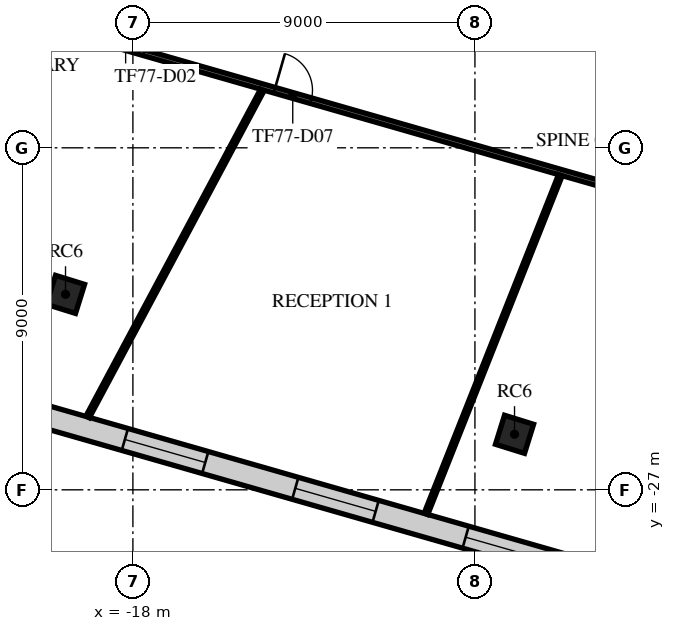
"""IFC4 building model, lengths in metres.
Left out: names, types, materials, properties, quantities, classifications, styles, units other than length and angle.
Written with IfcOpenShell. Run it as: python <this file> out.ifc"""

import sys

from ifc_helpers import new_model, si_unit, direction, frame, frame_2d, origin, origin_2d, place, context, subcontext, project, spatial, rectangle, extrude, element, fill, save


model = new_model("IFC4")
c1 = context("Model", 3, precision=1e-05, world=origin(), true_north=direction((0.0, 1.0)))
c2 = subcontext(c1, "Body", "Model", "MODEL_VIEW")
j1 = project(units=[si_unit("LENGTHUNIT", "METRE"), si_unit("PLANEANGLEUNIT", "RADIAN")], contexts=[c1])
p1 = place(None, origin())
s1 = spatial("IfcSite", under=j1, at=p1, CompositionType="ELEMENT")
p2 = place(p1, origin())
s2 = spatial("IfcBuilding", under=s1, at=p2, CompositionType="ELEMENT")
p3 = place(p2, frame((0.0, 0.0, 324.5)))
s3 = spatial("IfcBuildingStorey", under=s2, at=p3, CompositionType="ELEMENT", Elevation=324.5)
for number, where, z_axis, x_axis in (
    (1, (-19.773, -21.857, 0.0), (0.0, 0.0, 1.0), (0.298, 0.955, 0.0)),
    (2, (-7.958, -25.539, 0.0), (0.0, 0.0, 1.0), (0.298, 0.955, 0.0)),
):
    element("IfcColumn", number, at=place(p3, frame(where, z_axis=z_axis, x_axis=x_axis)), inside=s3, PredefinedType="COLUMN", context=c2, shape_type="SweptSolid", body=[
        extrude(rectangle(XDim=0.8, YDim=0.8, at=origin_2d()), origin(), (0.0, 0.0, 1.0), 4.0),
    ])
p4 = place(p3, frame((-18.913, 30.91, 0.0), z_axis=(0.0, 0.0, 1.0), x_axis=(-0.275636693765, -0.961261885778, 0.0)))
e3 = element("IfcWall", 3, at=p4, inside=s3, PredefinedType="STANDARD", context=c2, shape_type="SweptSolid", body=[
    extrude(rectangle(XDim=48.49, YDim=0.6, at=frame_2d((24.245, 0.0))), origin(), (0.0, 0.0, 1.0), 3.65),
])
p5 = place(p4, frame((1.204, 0.0, 0.9)))
e4 = element("IfcOpeningElement", 4, at=p5, cuts=e3, PredefinedType="OPENING", context=c2, shape_type="SweptSolid", body=[
    extrude(rectangle(XDim=2.0, YDim=2.1, at=frame_2d((1.0, 1.05))), frame((0.0, 0.31, 0.0), z_axis=(0.0, -1.0, 0.0), x_axis=(1.0, 0.0, 0.0)), (0.0, 0.0, 1.0), 0.62),
])
p6 = place(p4, frame((5.612, 0.0, 0.9)))
e5 = element("IfcOpeningElement", 5, at=p6, cuts=e3, PredefinedType="OPENING", context=c2, shape_type="SweptSolid", body=[
    extrude(rectangle(XDim=2.0, YDim=2.1, at=frame_2d((1.0, 1.05))), frame((0.0, 0.31, 0.0), z_axis=(0.0, -1.0, 0.0), x_axis=(1.0, 0.0, 0.0)), (0.0, 0.0, 1.0), 0.62),
])
p7 = place(p4, frame((10.021, 0.0, 0.9)))
e6 = element("IfcOpeningElement", 6, at=p7, cuts=e3, PredefinedType="OPENING", context=c2, shape_type="SweptSolid", body=[
    extrude(rectangle(XDim=2.0, YDim=2.1, at=frame_2d((1.0, 1.05))), frame((0.0, 0.31, 0.0), z_axis=(0.0, -1.0, 0.0), x_axis=(1.0, 0.0, 0.0)), (0.0, 0.0, 1.0), 0.62),
])
p8 = place(p4, frame((14.428, 0.0, 0.9)))
e7 = element("IfcOpeningElement", 7, at=p8, cuts=e3, PredefinedType="OPENING", context=c2, shape_type="SweptSolid", body=[
    extrude(rectangle(XDim=2.0, YDim=2.1, at=frame_2d((1.0, 1.05))), frame((0.0, 0.31, 0.0), z_axis=(0.0, -1.0, 0.0), x_axis=(1.0, 0.0, 0.0)), (0.0, 0.0, 1.0), 0.62),
])
p9 = place(p4, frame((18.837, 0.0, 0.9)))
e8 = element("IfcOpeningElement", 8, at=p9, cuts=e3, PredefinedType="OPENING", context=c2, shape_type="SweptSolid", body=[
    extrude(rectangle(XDim=2.0, YDim=2.1, at=frame_2d((1.0, 1.05))), frame((0.0, 0.31, 0.0), z_axis=(0.0, -1.0, 0.0), x_axis=(1.0, 0.0, 0.0)), (0.0, 0.0, 1.0), 0.62),
])
p10 = place(p4, frame((23.245, 0.0, 0.9)))
e9 = element("IfcOpeningElement", 9, at=p10, cuts=e3, PredefinedType="OPENING", context=c2, shape_type="SweptSolid", body=[
    extrude(rectangle(XDim=2.0, YDim=2.1, at=frame_2d((1.0, 1.05))), frame((0.0, 0.31, 0.0), z_axis=(0.0, -1.0, 0.0), x_axis=(1.0, 0.0, 0.0)), (0.0, 0.0, 1.0), 0.62),
])
p11 = place(p4, frame((27.653, 0.0, 0.9)))
e10 = element("IfcOpeningElement", 10, at=p11, cuts=e3, PredefinedType="OPENING", context=c2, shape_type="SweptSolid", body=[
    extrude(rectangle(XDim=2.0, YDim=2.1, at=frame_2d((1.0, 1.05))), frame((0.0, 0.31, 0.0), z_axis=(0.0, -1.0, 0.0), x_axis=(1.0, 0.0, 0.0)), (0.0, 0.0, 1.0), 0.62),
])
p12 = place(p4, frame((32.061, 0.0, 0.9)))
e11 = element("IfcOpeningElement", 11, at=p12, cuts=e3, PredefinedType="OPENING", context=c2, shape_type="SweptSolid", body=[
    extrude(rectangle(XDim=2.0, YDim=2.1, at=frame_2d((1.0, 1.05))), frame((0.0, 0.31, 0.0), z_axis=(0.0, -1.0, 0.0), x_axis=(1.0, 0.0, 0.0)), (0.0, 0.0, 1.0), 0.62),
])
p13 = place(p4, frame((36.469, 0.0, 0.9)))
e12 = element("IfcOpeningElement", 12, at=p13, cuts=e3, PredefinedType="OPENING", context=c2, shape_type="SweptSolid", body=[
    extrude(rectangle(XDim=2.0, YDim=2.1, at=frame_2d((1.0, 1.05))), frame((0.0, 0.31, 0.0), z_axis=(0.0, -1.0, 0.0), x_axis=(1.0, 0.0, 0.0)), (0.0, 0.0, 1.0), 0.62),
])
p14 = place(p4, frame((40.877, 0.0, 0.9)))
e13 = element("IfcOpeningElement", 13, at=p14, cuts=e3, PredefinedType="OPENING", context=c2, shape_type="SweptSolid", body=[
    extrude(rectangle(XDim=2.0, YDim=2.1, at=frame_2d((1.0, 1.05))), frame((0.0, 0.31, 0.0), z_axis=(0.0, -1.0, 0.0), x_axis=(1.0, 0.0, 0.0)), (0.0, 0.0, 1.0), 0.62),
])
p15 = place(p4, frame((45.285, 0.0, 0.9)))
e14 = element("IfcOpeningElement", 14, at=p15, cuts=e3, PredefinedType="OPENING", context=c2, shape_type="SweptSolid", body=[
    extrude(rectangle(XDim=2.0, YDim=2.1, at=frame_2d((1.0, 1.05))), frame((0.0, 0.31, 0.0), z_axis=(0.0, -1.0, 0.0), x_axis=(1.0, 0.0, 0.0)), (0.0, 0.0, 1.0), 0.62),
])
p16 = place(p3, frame((-28.363, -22.764, 0.0), z_axis=(0.0, 0.0, 1.0), x_axis=(0.961261250735, -0.275638908422, 0.0)))
e15 = element("IfcWall", 15, at=p16, inside=s3, PredefinedType="STANDARD", context=c2, shape_type="SweptSolid", body=[
    extrude(rectangle(XDim=41.979, YDim=0.6, at=frame_2d((20.99, 0.0))), origin(), (0.0, 0.0, 1.0), 3.65),
])
p17 = place(p16, frame((1.232, 0.0, 0.9)))
e16 = element("IfcOpeningElement", 16, at=p17, cuts=e15, PredefinedType="OPENING", context=c2, shape_type="SweptSolid", body=[
    extrude(rectangle(XDim=2.2, YDim=2.1, at=frame_2d((1.1, 1.05))), frame((0.0, 0.31, 0.0), z_axis=(0.0, -1.0, 0.0), x_axis=(1.0, 0.0, 0.0)), (0.0, 0.0, 1.0), 0.62),
])
p18 = place(p16, frame((5.896, 0.0, 0.9)))
e17 = element("IfcOpeningElement", 17, at=p18, cuts=e15, PredefinedType="OPENING", context=c2, shape_type="SweptSolid", body=[
    extrude(rectangle(XDim=2.2, YDim=2.1, at=frame_2d((1.1, 1.05))), frame((0.0, 0.31, 0.0), z_axis=(0.0, -1.0, 0.0), x_axis=(1.0, 0.0, 0.0)), (0.0, 0.0, 1.0), 0.62),
])
p19 = place(p16, frame((10.561, 0.0, 0.9)))
e18 = element("IfcOpeningElement", 18, at=p19, cuts=e15, PredefinedType="OPENING", context=c2, shape_type="SweptSolid", body=[
    extrude(rectangle(XDim=2.2, YDim=2.1, at=frame_2d((1.1, 1.05))), frame((0.0, 0.31, 0.0), z_axis=(0.0, -1.0, 0.0), x_axis=(1.0, 0.0, 0.0)), (0.0, 0.0, 1.0), 0.62),
])
p20 = place(p16, frame((15.225, 0.0, 0.9)))
e19 = element("IfcOpeningElement", 19, at=p20, cuts=e15, PredefinedType="OPENING", context=c2, shape_type="SweptSolid", body=[
    extrude(rectangle(XDim=2.2, YDim=2.1, at=frame_2d((1.1, 1.05))), frame((0.0, 0.31, 0.0), z_axis=(0.0, -1.0, 0.0), x_axis=(1.0, 0.0, 0.0)), (0.0, 0.0, 1.0), 0.62),
])
p21 = place(p16, frame((19.89, 0.0, 0.9)))
e20 = element("IfcOpeningElement", 20, at=p21, cuts=e15, PredefinedType="OPENING", context=c2, shape_type="SweptSolid", body=[
    extrude(rectangle(XDim=2.2, YDim=2.1, at=frame_2d((1.1, 1.05))), frame((0.0, 0.31, 0.0), z_axis=(0.0, -1.0, 0.0), x_axis=(1.0, 0.0, 0.0)), (0.0, 0.0, 1.0), 0.62),
])
p22 = place(p16, frame((24.554, 0.0, 0.9)))
e21 = element("IfcOpeningElement", 21, at=p22, cuts=e15, PredefinedType="OPENING", context=c2, shape_type="SweptSolid", body=[
    extrude(rectangle(XDim=2.2, YDim=2.1, at=frame_2d((1.1, 1.05))), frame((0.0, 0.31, 0.0), z_axis=(0.0, -1.0, 0.0), x_axis=(1.0, 0.0, 0.0)), (0.0, 0.0, 1.0), 0.62),
])
p23 = place(p16, frame((29.218, 0.0, 0.9)))
e22 = element("IfcOpeningElement", 22, at=p23, cuts=e15, PredefinedType="OPENING", context=c2, shape_type="SweptSolid", body=[
    extrude(rectangle(XDim=2.2, YDim=2.1, at=frame_2d((1.1, 1.05))), frame((0.0, 0.31, 0.0), z_axis=(0.0, -1.0, 0.0), x_axis=(1.0, 0.0, 0.0)), (0.0, 0.0, 1.0), 0.62),
])
p24 = place(p16, frame((33.883, 0.0, 0.9)))
e23 = element("IfcOpeningElement", 23, at=p24, cuts=e15, PredefinedType="OPENING", context=c2, shape_type="SweptSolid", body=[
    extrude(rectangle(XDim=2.2, YDim=2.1, at=frame_2d((1.1, 1.05))), frame((0.0, 0.31, 0.0), z_axis=(0.0, -1.0, 0.0), x_axis=(1.0, 0.0, 0.0)), (0.0, 0.0, 1.0), 0.62),
])
p25 = place(p16, frame((38.547, 0.0, 0.9)))
e24 = element("IfcOpeningElement", 24, at=p25, cuts=e15, PredefinedType="OPENING", context=c2, shape_type="SweptSolid", body=[
    extrude(rectangle(XDim=2.2, YDim=2.1, at=frame_2d((1.1, 1.05))), frame((0.0, 0.31, 0.0), z_axis=(0.0, -1.0, 0.0), x_axis=(1.0, 0.0, 0.0)), (0.0, 0.0, 1.0), 0.62),
])
p26 = place(p3, frame((-24.007, -13.694, 0.0), z_axis=(0.0, 0.0, 1.0), x_axis=(0.961264140923, -0.275628828998, 0.0)))
e25 = element("IfcWall", 25, at=p26, inside=s3, PredefinedType="PARTITIONING", context=c2, shape_type="SweptSolid", body=[
    extrude(rectangle(XDim=38.68, YDim=0.15, at=frame_2d((19.34, 0.0))), origin(), (0.0, 0.0, 1.0), 3.25),
])
p27 = place(p26, frame((0.3, 0.0, 0.0)))
e26 = element("IfcOpeningElement", 26, at=p27, cuts=e25, PredefinedType="OPENING", context=c2, shape_type="SweptSolid", body=[
    extrude(rectangle(XDim=1.8, YDim=2.1, at=frame_2d((0.9, 1.05))), frame((0.0, 0.085, 0.0), z_axis=(0.0, -1.0, 0.0), x_axis=(1.0, 0.0, 0.0)), (0.0, 0.0, 1.0), 0.17),
])
p28 = place(p26, frame((5.55, 0.0, 0.0)))
e27 = element("IfcOpeningElement", 27, at=p28, cuts=e25, PredefinedType="OPENING", context=c2, shape_type="SweptSolid", body=[
    extrude(rectangle(XDim=1.0, YDim=2.1, at=frame_2d((0.5, 1.05))), frame((0.0, 0.085, 0.0), z_axis=(0.0, -1.0, 0.0), x_axis=(1.0, 0.0, 0.0)), (0.0, 0.0, 1.0), 0.17),
])
p29 = place(p26, frame((10.125, 0.0, 0.0)))
e28 = element("IfcOpeningElement", 28, at=p29, cuts=e25, PredefinedType="OPENING", context=c2, shape_type="SweptSolid", body=[
    extrude(rectangle(XDim=1.0, YDim=2.1, at=frame_2d((0.5, 1.05))), frame((0.0, 0.085, 0.0), z_axis=(0.0, -1.0, 0.0), x_axis=(1.0, 0.0, 0.0)), (0.0, 0.0, 1.0), 0.17),
])
p30 = place(p26, frame((23.776, 0.0, 0.0)))
e29 = element("IfcOpeningElement", 29, at=p30, cuts=e25, PredefinedType="OPENING", context=c2, shape_type="SweptSolid", body=[
    extrude(rectangle(XDim=1.0, YDim=2.1, at=frame_2d((0.5, 1.05))), frame((0.0, 0.085, 0.0), z_axis=(0.0, -1.0, 0.0), x_axis=(1.0, 0.0, 0.0)), (0.0, 0.0, 1.0), 0.17),
])
p31 = place(p26, frame((31.675, 0.0, 0.0)))
e30 = element("IfcOpeningElement", 30, at=p31, cuts=e25, PredefinedType="OPENING", context=c2, shape_type="SweptSolid", body=[
    extrude(rectangle(XDim=1.8, YDim=2.1, at=frame_2d((0.9, 1.05))), frame((0.0, 0.085, 0.0), z_axis=(0.0, -1.0, 0.0), x_axis=(1.0, 0.0, 0.0)), (0.0, 0.0, 1.0), 0.17),
])
p32 = place(p3, frame((-19.19, -25.08, 0.0), z_axis=(0.0, 0.0, 1.0), x_axis=(0.471201621995, 0.882025527652, 0.0)))
e31 = element("IfcWall", 31, at=p32, inside=s3, PredefinedType="PARTITIONING", context=c2, shape_type="SweptSolid", body=[
    extrude(rectangle(XDim=9.749, YDim=0.1, at=frame_2d((4.875, 0.0))), origin(), (0.0, 0.0, 1.0), 3.05),
])
p33 = place(p3, frame((-10.289, -27.633, 0.0), z_axis=(0.0, 0.0, 1.0), x_axis=(0.368868227501, 0.929481700057, 0.0)))
e32 = element("IfcWall", 32, at=p33, inside=s3, PredefinedType="PARTITIONING", context=c2, shape_type="SweptSolid", body=[
    extrude(rectangle(XDim=9.584, YDim=0.1, at=frame_2d((4.792, 0.0))), origin(), (0.0, 0.0, 1.0), 3.05),
])
p34 = place(p19, origin())
e33 = element("IfcWindow", 33, at=p34, inside=s3, PartitioningType="SINGLE_PANEL", PredefinedType="WINDOW", context=c2, shape_type="SweptSolid", body=[
    extrude(rectangle(XDim=2.2, YDim=2.1, at=frame_2d((1.1, 1.05))), frame((0.0, 0.03, 0.0), z_axis=(0.0, -1.0, 0.0), x_axis=(1.0, 0.0, 0.0)), (0.0, 0.0, 1.0), 0.06),
])
fill(e18, e33)
p35 = place(p20, origin())
e34 = element("IfcWindow", 34, at=p35, inside=s3, PartitioningType="SINGLE_PANEL", PredefinedType="WINDOW", context=c2, shape_type="SweptSolid", body=[
    extrude(rectangle(XDim=2.2, YDim=2.1, at=frame_2d((1.1, 1.05))), frame((0.0, 0.03, 0.0), z_axis=(0.0, -1.0, 0.0), x_axis=(1.0, 0.0, 0.0)), (0.0, 0.0, 1.0), 0.06),
])
fill(e19, e34)
p36 = place(p21, origin())
e35 = element("IfcWindow", 35, at=p36, inside=s3, PartitioningType="SINGLE_PANEL", PredefinedType="WINDOW", context=c2, shape_type="SweptSolid", body=[
    extrude(rectangle(XDim=2.2, YDim=2.1, at=frame_2d((1.1, 1.05))), frame((0.0, 0.03, 0.0), z_axis=(0.0, -1.0, 0.0), x_axis=(1.0, 0.0, 0.0)), (0.0, 0.0, 1.0), 0.06),
])
fill(e20, e35)
p37 = place(p28, frame((1.0, 0.0, 0.0), z_axis=(0.0, 0.0, 1.0), x_axis=(-1.0, 0.0, 0.0)))
e36 = element("IfcDoor", 36, at=p37, inside=s3, OperationType="SINGLE_SWING_RIGHT", PredefinedType="DOOR", context=c2, shape_type="SweptSolid", body=[
    extrude(rectangle(XDim=1.0, YDim=2.1, at=frame_2d((0.5, 1.05))), frame((0.0, 0.025, 0.0), z_axis=(0.0, -1.0, 0.0), x_axis=(1.0, 0.0, 0.0)), (0.0, 0.0, 1.0), 0.05),
])
fill(e27, e36)
p38 = place(p29, frame((1.0, 0.0, 0.0), z_axis=(0.0, 0.0, 1.0), x_axis=(-1.0, 0.0, 0.0)))
e37 = element("IfcDoor", 37, at=p38, inside=s3, OperationType="SINGLE_SWING_LEFT", PredefinedType="DOOR", context=c2, shape_type="SweptSolid", body=[
    extrude(rectangle(XDim=1.0, YDim=2.1, at=frame_2d((0.5, 1.05))), frame((0.0, 0.025, 0.0), z_axis=(0.0, -1.0, 0.0), x_axis=(1.0, 0.0, 0.0)), (0.0, 0.0, 1.0), 0.05),
])
fill(e28, e37)
save(model, sys.argv[1])
